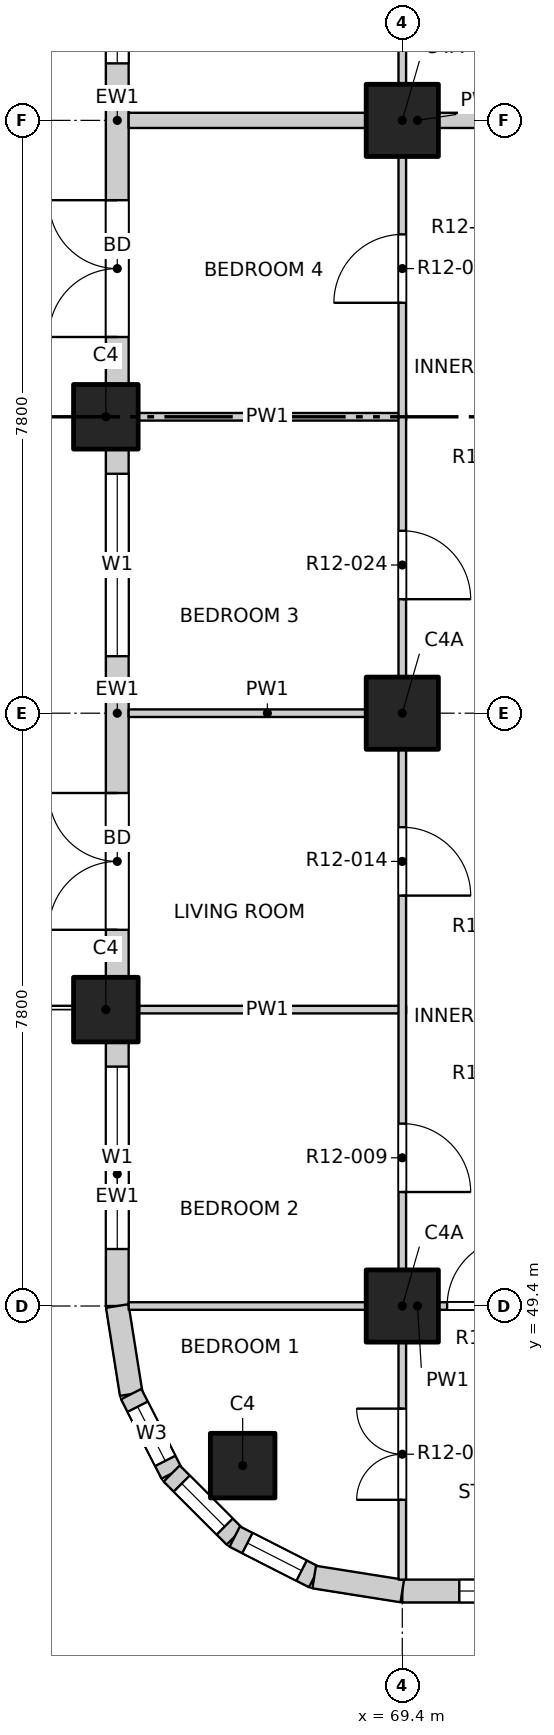
"""IFC4 building model, lengths in metres.
Left out: names, types, materials, properties, quantities, classifications, styles, units other than length and angle.
Written with IfcOpenShell. Run it as: python <this file> out.ifc"""

import sys

from ifc_helpers import new_model, si_unit, direction, frame, frame_2d, origin, origin_2d, place, context, subcontext, project, spatial, rectangle, extrude, element, fill, save


model = new_model("IFC4")
c1 = context("Model", 3, precision=1e-05, world=origin(), true_north=direction((0.0, 1.0)))
c2 = subcontext(c1, "Body", "Model", "MODEL_VIEW")
j1 = project(units=[si_unit("LENGTHUNIT", "METRE"), si_unit("PLANEANGLEUNIT", "RADIAN")], contexts=[c1])
p1 = place(None, origin())
s1 = spatial("IfcSite", under=j1, at=p1, CompositionType="ELEMENT")
p2 = place(p1, origin())
s2 = spatial("IfcBuilding", under=s1, at=p2, CompositionType="ELEMENT")
p3 = place(p2, frame((0.0, 0.0, 137.3)))
s3 = spatial("IfcBuildingStorey", under=s2, at=p3, CompositionType="ELEMENT", Elevation=137.3)
for number, where, z_axis, x_axis in (
    (1, (67.3, 47.3, -0.25), (0.0, 0.0, 1.0), (1.0, 0.0, 0.0)),
    (2, (65.5, 53.3, -0.25), (0.0, 0.0, 1.0), (1.0, 0.0, 0.0)),
    (3, (65.5, 61.1, -0.25), (0.0, 0.0, 1.0), (1.0, 0.0, 0.0)),
):
    element("IfcColumn", number, at=place(p3, frame(where, z_axis=z_axis, x_axis=x_axis)), inside=s3, PredefinedType="COLUMN", context=c2, shape_type="SweptSolid", body=[
        extrude(rectangle(XDim=0.85, YDim=0.85, at=origin_2d()), origin(), (0.0, 0.0, 1.0), 3.4),
    ])
for number, where, z_axis, x_axis in (
    (4, (69.4, 49.4, -0.25), (0.0, 0.0, 1.0), (1.0, 0.0, 0.0)),
    (5, (69.4, 57.2, -0.25), (0.0, 0.0, 1.0), (1.0, 0.0, 0.0)),
    (6, (69.4, 65.0, -0.25), (0.0, 0.0, 1.0), (1.0, 0.0, 0.0)),
):
    element("IfcColumn", number, at=place(p3, frame(where, z_axis=z_axis, x_axis=x_axis)), inside=s3, PredefinedType="COLUMN", context=c2, shape_type="SweptSolid", body=[
        extrude(rectangle(XDim=0.95, YDim=0.95, at=origin_2d()), origin(), (0.0, 0.0, 1.0), 3.4),
    ])
p4 = place(p3, frame((69.4, 45.65, 0.0), z_axis=(0.0, 0.0, 1.0), x_axis=(1.0, 0.0, 0.0)))
e7 = element("IfcWall", 7, at=p4, inside=s3, PredefinedType="SOLIDWALL", context=c2, shape_type="SweptSolid", body=[
    extrude(rectangle(XDim=3.475, YDim=0.3, at=frame_2d((1.738, 0.0))), origin(), (0.0, 0.0, 1.0), 2.7),
])
p5 = place(p4, frame((0.75, 0.0, 0.9)))
e8 = element("IfcOpeningElement", 8, at=p5, cuts=e7, PredefinedType="OPENING", context=c2, shape_type="SweptSolid", body=[
    extrude(rectangle(XDim=2.4, YDim=1.8, at=frame_2d((1.2, 0.9))), frame((0.0, 0.16, 0.0), z_axis=(0.0, -1.0, 0.0), x_axis=(1.0, 0.0, 0.0)), (0.0, 0.0, 1.0), 0.32),
])
p6 = place(p3, frame((65.65, 49.4, 0.0), z_axis=(0.0, 0.0, 1.0), x_axis=(0.0, 1.0, 0.0)))
e9 = element("IfcWall", 9, at=p6, inside=s3, PredefinedType="SOLIDWALL", context=c2, shape_type="SweptSolid", body=[
    extrude(rectangle(XDim=3.475, YDim=0.3, at=frame_2d((1.738, 0.0))), origin(), (0.0, 0.0, 1.0), 2.7),
])
p7 = place(p6, frame((0.75, 0.0, 0.9)))
e10 = element("IfcOpeningElement", 10, at=p7, cuts=e9, PredefinedType="OPENING", context=c2, shape_type="SweptSolid", body=[
    extrude(rectangle(XDim=2.4, YDim=1.8, at=frame_2d((1.2, 0.9))), frame((0.0, 0.16, 0.0), z_axis=(0.0, -1.0, 0.0), x_axis=(1.0, 0.0, 0.0)), (0.0, 0.0, 1.0), 0.32),
])
p8 = place(p3, frame((65.65, 53.725, 0.0), z_axis=(0.0, 0.0, 1.0), x_axis=(0.0, 1.0, 0.0)))
e11 = element("IfcWall", 11, at=p8, inside=s3, PredefinedType="SOLIDWALL", context=c2, shape_type="SweptSolid", body=[
    extrude(rectangle(XDim=6.95, YDim=0.3, at=frame_2d((3.475, 0.0))), origin(), (0.0, 0.0, 1.0), 2.7),
])
p9 = place(p8, frame((0.625, 0.0, 0.0)))
e12 = element("IfcOpeningElement", 12, at=p9, cuts=e11, PredefinedType="OPENING", context=c2, shape_type="SweptSolid", body=[
    extrude(rectangle(XDim=1.8, YDim=2.4, at=frame_2d((0.9, 1.2))), frame((0.0, 0.16, 0.0), z_axis=(0.0, -1.0, 0.0), x_axis=(1.0, 0.0, 0.0)), (0.0, 0.0, 1.0), 0.32),
])
p10 = place(p8, frame((4.225, 0.0, 0.9)))
e13 = element("IfcOpeningElement", 13, at=p10, cuts=e11, PredefinedType="OPENING", context=c2, shape_type="SweptSolid", body=[
    extrude(rectangle(XDim=2.4, YDim=1.8, at=frame_2d((1.2, 0.9))), frame((0.0, 0.16, 0.0), z_axis=(0.0, -1.0, 0.0), x_axis=(1.0, 0.0, 0.0)), (0.0, 0.0, 1.0), 0.32),
])
p11 = place(p3, frame((65.65, 61.525, 0.0), z_axis=(0.0, 0.0, 1.0), x_axis=(0.0, 1.0, 0.0)))
e14 = element("IfcWall", 14, at=p11, inside=s3, PredefinedType="SOLIDWALL", context=c2, shape_type="SweptSolid", body=[
    extrude(rectangle(XDim=6.95, YDim=0.3, at=frame_2d((3.475, 0.0))), origin(), (0.0, 0.0, 1.0), 2.7),
])
p12 = place(p11, frame((0.625, 0.0, 0.0)))
e15 = element("IfcOpeningElement", 15, at=p12, cuts=e14, PredefinedType="OPENING", context=c2, shape_type="SweptSolid", body=[
    extrude(rectangle(XDim=1.8, YDim=2.4, at=frame_2d((0.9, 1.2))), frame((0.0, 0.16, 0.0), z_axis=(0.0, -1.0, 0.0), x_axis=(1.0, 0.0, 0.0)), (0.0, 0.0, 1.0), 0.32),
])
p13 = place(p11, frame((4.225, 0.0, 0.9)))
e16 = element("IfcOpeningElement", 16, at=p13, cuts=e14, PredefinedType="OPENING", context=c2, shape_type="SweptSolid", body=[
    extrude(rectangle(XDim=2.4, YDim=1.8, at=frame_2d((1.2, 0.9))), frame((0.0, 0.16, 0.0), z_axis=(0.0, -1.0, 0.0), x_axis=(1.0, 0.0, 0.0)), (0.0, 0.0, 1.0), 0.32),
])
p14 = place(p3, frame((65.65, 49.4, 0.0), z_axis=(0.0, 0.0, 1.0), x_axis=(0.156496880861, -0.987678452879, 0.0)))
e17 = element("IfcWall", 17, at=p14, inside=s3, PredefinedType="SOLIDWALL", context=c2, shape_type="SweptSolid", body=[
    extrude(rectangle(XDim=1.173, YDim=0.3, at=frame_2d((0.586, 0.0))), origin(), (0.0, 0.0, 1.0), 2.7),
])
p15 = place(p3, frame((65.833, 48.241, 0.0), z_axis=(0.0, 0.0, 1.0), x_axis=(0.454025524128, -0.890988677504, 0.0)))
e18 = element("IfcWall", 18, at=p15, inside=s3, PredefinedType="SOLIDWALL", context=c2, shape_type="SweptSolid", body=[
    extrude(rectangle(XDim=1.173, YDim=0.3, at=frame_2d((0.587, 0.0))), origin(), (0.0, 0.0, 1.0), 2.7),
])
p16 = place(p15, frame((0.187, 0.0, 0.9)))
e19 = element("IfcOpeningElement", 19, at=p16, cuts=e18, PredefinedType="OPENING", context=c2, shape_type="SweptSolid", body=[
    extrude(rectangle(XDim=0.8, YDim=1.2, at=frame_2d((0.4, 0.6))), frame((0.0, 0.16, 0.0), z_axis=(0.0, -1.0, 0.0), x_axis=(1.0, 0.0, 0.0)), (0.0, 0.0, 1.0), 0.32),
])
p17 = place(p3, frame((66.366, 47.196, 0.0), z_axis=(0.0, 0.0, 1.0), x_axis=(0.707106781187, -0.707106781187, 0.0)))
e20 = element("IfcWall", 20, at=p17, inside=s3, PredefinedType="SOLIDWALL", context=c2, shape_type="SweptSolid", body=[
    extrude(rectangle(XDim=1.173, YDim=0.3, at=frame_2d((0.586, 0.0))), origin(), (0.0, 0.0, 1.0), 2.7),
])
p18 = place(p17, frame((0.187, 0.0, 0.9)))
e21 = element("IfcOpeningElement", 21, at=p18, cuts=e20, PredefinedType="OPENING", context=c2, shape_type="SweptSolid", body=[
    extrude(rectangle(XDim=0.8, YDim=1.2, at=frame_2d((0.4, 0.6))), frame((0.0, 0.16, 0.0), z_axis=(0.0, -1.0, 0.0), x_axis=(1.0, 0.0, 0.0)), (0.0, 0.0, 1.0), 0.32),
])
p19 = place(p3, frame((67.196, 46.366, 0.0), z_axis=(0.0, 0.0, 1.0), x_axis=(0.890988677504, -0.454025524128, 0.0)))
e22 = element("IfcWall", 22, at=p19, inside=s3, PredefinedType="SOLIDWALL", context=c2, shape_type="SweptSolid", body=[
    extrude(rectangle(XDim=1.173, YDim=0.3, at=frame_2d((0.587, 0.0))), origin(), (0.0, 0.0, 1.0), 2.7),
])
p20 = place(p19, frame((0.187, 0.0, 0.9)))
e23 = element("IfcOpeningElement", 23, at=p20, cuts=e22, PredefinedType="OPENING", context=c2, shape_type="SweptSolid", body=[
    extrude(rectangle(XDim=0.8, YDim=1.2, at=frame_2d((0.4, 0.6))), frame((0.0, 0.16, 0.0), z_axis=(0.0, -1.0, 0.0), x_axis=(1.0, 0.0, 0.0)), (0.0, 0.0, 1.0), 0.32),
])
p21 = place(p3, frame((68.241, 45.833, 0.0), z_axis=(0.0, 0.0, 1.0), x_axis=(0.987678452879, -0.156496880861, 0.0)))
e24 = element("IfcWall", 24, at=p21, inside=s3, PredefinedType="SOLIDWALL", context=c2, shape_type="SweptSolid", body=[
    extrude(rectangle(XDim=1.173, YDim=0.3, at=frame_2d((0.586, 0.0))), origin(), (0.0, 0.0, 1.0), 2.7),
])
p22 = place(p3, frame((65.8, 49.4, 0.0), z_axis=(0.0, 0.0, 1.0), x_axis=(1.0, 0.0, 0.0)))
e25 = element("IfcWall", 25, at=p22, inside=s3, PredefinedType="PARTITIONING", context=c2, shape_type="SweptSolid", body=[
    extrude(rectangle(XDim=7.6, YDim=0.1, at=frame_2d((3.8, 0.0))), origin(), (0.0, 0.0, 1.0), 3.15),
])
p23 = place(p22, frame((4.19, 0.0, 0.0)))
e26 = element("IfcOpeningElement", 26, at=p23, cuts=e25, PredefinedType="OPENING", context=c2, shape_type="SweptSolid", body=[
    extrude(rectangle(XDim=0.9, YDim=2.1, at=frame_2d((0.45, 1.05))), frame((0.0, 0.06, 0.0), z_axis=(0.0, -1.0, 0.0), x_axis=(1.0, 0.0, 0.0)), (0.0, 0.0, 1.0), 0.12),
])
for number, where, z_axis, x_axis in (
    (27, (65.8, 53.3, 0.0), (0.0, 0.0, 1.0), (1.0, 0.0, 0.0)),
    (28, (65.8, 57.2, 0.0), (0.0, 0.0, 1.0), (1.0, 0.0, 0.0)),
):
    element("IfcWall", number, at=place(p3, frame(where, z_axis=z_axis, x_axis=x_axis)), inside=s3, PredefinedType="PARTITIONING", context=c2, shape_type="SweptSolid", body=[
        extrude(rectangle(XDim=3.65, YDim=0.1, at=frame_2d((1.825, 0.0))), origin(), (0.0, 0.0, 1.0), 3.15),
    ])
p24 = place(p3, frame((65.8, 61.1, 0.0), z_axis=(0.0, 0.0, 1.0), x_axis=(1.0, 0.0, 0.0)))
e29 = element("IfcWall", 29, at=p24, inside=s3, PredefinedType="PARTITIONING", context=c2, shape_type="SweptSolid", body=[
    extrude(rectangle(XDim=3.65, YDim=0.1, at=frame_2d((1.825, 0.0))), origin(), (0.0, 0.0, 1.0), 2.55),
])
p25 = place(p3, frame((65.8, 65.0, 0.0), z_axis=(0.0, 0.0, 1.0), x_axis=(1.0, 0.0, 0.0)))
e30 = element("IfcWall", 30, at=p25, inside=s3, PredefinedType="PARTITIONING", context=c2, shape_type="SweptSolid", body=[
    extrude(rectangle(XDim=7.6, YDim=0.2, at=frame_2d((3.8, 0.0))), origin(), (0.0, 0.0, 1.0), 3.15),
])
p26 = place(p3, frame((69.4, 45.8, 0.0), z_axis=(0.0, 0.0, 1.0), x_axis=(0.0, 1.0, 0.0)))
e31 = element("IfcWall", 31, at=p26, inside=s3, PredefinedType="PARTITIONING", context=c2, shape_type="SweptSolid", body=[
    extrude(rectangle(XDim=38.4, YDim=0.1, at=frame_2d((19.2, 0.0))), origin(), (0.0, 0.0, 1.0), 3.15),
])
p27 = place(p26, frame((1.05, 0.0, 0.0)))
e32 = element("IfcOpeningElement", 32, at=p27, cuts=e31, PredefinedType="OPENING", context=c2, shape_type="SweptSolid", body=[
    extrude(rectangle(XDim=1.2, YDim=2.1, at=frame_2d((0.6, 1.05))), frame((0.0, 0.06, 0.0), z_axis=(0.0, -1.0, 0.0), x_axis=(1.0, 0.0, 0.0)), (0.0, 0.0, 1.0), 0.12),
])
p28 = place(p26, frame((5.1, 0.0, 0.0)))
e33 = element("IfcOpeningElement", 33, at=p28, cuts=e31, PredefinedType="OPENING", context=c2, shape_type="SweptSolid", body=[
    extrude(rectangle(XDim=0.9, YDim=2.1, at=frame_2d((0.45, 1.05))), frame((0.0, 0.06, 0.0), z_axis=(0.0, -1.0, 0.0), x_axis=(1.0, 0.0, 0.0)), (0.0, 0.0, 1.0), 0.12),
])
p29 = place(p26, frame((9.0, 0.0, 0.0)))
e34 = element("IfcOpeningElement", 34, at=p29, cuts=e31, PredefinedType="OPENING", context=c2, shape_type="SweptSolid", body=[
    extrude(rectangle(XDim=0.9, YDim=2.1, at=frame_2d((0.45, 1.05))), frame((0.0, 0.06, 0.0), z_axis=(0.0, -1.0, 0.0), x_axis=(1.0, 0.0, 0.0)), (0.0, 0.0, 1.0), 0.12),
])
p30 = place(p26, frame((12.9, 0.0, 0.0)))
e35 = element("IfcOpeningElement", 35, at=p30, cuts=e31, PredefinedType="OPENING", context=c2, shape_type="SweptSolid", body=[
    extrude(rectangle(XDim=0.9, YDim=2.1, at=frame_2d((0.45, 1.05))), frame((0.0, 0.06, 0.0), z_axis=(0.0, -1.0, 0.0), x_axis=(1.0, 0.0, 0.0)), (0.0, 0.0, 1.0), 0.12),
])
p31 = place(p26, frame((16.8, 0.0, 0.0)))
e36 = element("IfcOpeningElement", 36, at=p31, cuts=e31, PredefinedType="OPENING", context=c2, shape_type="SweptSolid", body=[
    extrude(rectangle(XDim=0.9, YDim=2.1, at=frame_2d((0.45, 1.05))), frame((0.0, 0.06, 0.0), z_axis=(0.0, -1.0, 0.0), x_axis=(1.0, 0.0, 0.0)), (0.0, 0.0, 1.0), 0.12),
])
p32 = place(p26, frame((20.7, 0.0, 0.0)))
e37 = element("IfcOpeningElement", 37, at=p32, cuts=e31, PredefinedType="OPENING", context=c2, shape_type="SweptSolid", body=[
    extrude(rectangle(XDim=0.9, YDim=2.1, at=frame_2d((0.45, 1.05))), frame((0.0, 0.06, 0.0), z_axis=(0.0, -1.0, 0.0), x_axis=(1.0, 0.0, 0.0)), (0.0, 0.0, 1.0), 0.12),
])
p33 = place(p26, frame((24.6, 0.0, 0.0)))
e38 = element("IfcOpeningElement", 38, at=p33, cuts=e31, PredefinedType="OPENING", context=c2, shape_type="SweptSolid", body=[
    extrude(rectangle(XDim=0.9, YDim=2.1, at=frame_2d((0.45, 1.05))), frame((0.0, 0.06, 0.0), z_axis=(0.0, -1.0, 0.0), x_axis=(1.0, 0.0, 0.0)), (0.0, 0.0, 1.0), 0.12),
])
p34 = place(p26, frame((28.5, 0.0, 0.0)))
e39 = element("IfcOpeningElement", 39, at=p34, cuts=e31, PredefinedType="OPENING", context=c2, shape_type="SweptSolid", body=[
    extrude(rectangle(XDim=0.9, YDim=2.1, at=frame_2d((0.45, 1.05))), frame((0.0, 0.06, 0.0), z_axis=(0.0, -1.0, 0.0), x_axis=(1.0, 0.0, 0.0)), (0.0, 0.0, 1.0), 0.12),
])
p35 = place(p26, frame((32.4, 0.0, 0.0)))
e40 = element("IfcOpeningElement", 40, at=p35, cuts=e31, PredefinedType="OPENING", context=c2, shape_type="SweptSolid", body=[
    extrude(rectangle(XDim=0.9, YDim=2.1, at=frame_2d((0.45, 1.05))), frame((0.0, 0.06, 0.0), z_axis=(0.0, -1.0, 0.0), x_axis=(1.0, 0.0, 0.0)), (0.0, 0.0, 1.0), 0.12),
])
p36 = place(p26, frame((36.15, 0.0, 0.0)))
e41 = element("IfcOpeningElement", 41, at=p36, cuts=e31, PredefinedType="OPENING", context=c2, shape_type="SweptSolid", body=[
    extrude(rectangle(XDim=1.2, YDim=2.1, at=frame_2d((0.6, 1.05))), frame((0.0, 0.06, 0.0), z_axis=(0.0, -1.0, 0.0), x_axis=(1.0, 0.0, 0.0)), (0.0, 0.0, 1.0), 0.12),
])
p37 = place(p5, origin())
e42 = element("IfcWindow", 42, at=p37, inside=s3, PartitioningType="DOUBLE_PANEL_VERTICAL", PredefinedType="WINDOW", context=c2, shape_type="SweptSolid", body=[
    extrude(rectangle(XDim=2.4, YDim=1.8, at=frame_2d((1.2, 0.9))), frame((0.0, 0.03, 0.0), z_axis=(0.0, -1.0, 0.0), x_axis=(1.0, 0.0, 0.0)), (0.0, 0.0, 1.0), 0.06),
])
fill(e8, e42)
p38 = place(p7, origin())
e43 = element("IfcWindow", 43, at=p38, inside=s3, PartitioningType="DOUBLE_PANEL_VERTICAL", PredefinedType="WINDOW", context=c2, shape_type="SweptSolid", body=[
    extrude(rectangle(XDim=2.4, YDim=1.8, at=frame_2d((1.2, 0.9))), frame((0.0, 0.03, 0.0), z_axis=(0.0, -1.0, 0.0), x_axis=(1.0, 0.0, 0.0)), (0.0, 0.0, 1.0), 0.06),
])
fill(e10, e43)
p39 = place(p9, origin())
e44 = element("IfcDoor", 44, at=p39, inside=s3, OperationType="DOUBLE_DOOR_SINGLE_SWING", PredefinedType="DOOR", context=c2, shape_type="SweptSolid", body=[
    extrude(rectangle(XDim=1.8, YDim=2.4, at=frame_2d((0.9, 1.2))), frame((0.0, 0.025, 0.0), z_axis=(0.0, -1.0, 0.0), x_axis=(1.0, 0.0, 0.0)), (0.0, 0.0, 1.0), 0.05),
])
fill(e12, e44)
p40 = place(p10, origin())
e45 = element("IfcWindow", 45, at=p40, inside=s3, PartitioningType="DOUBLE_PANEL_VERTICAL", PredefinedType="WINDOW", context=c2, shape_type="SweptSolid", body=[
    extrude(rectangle(XDim=2.4, YDim=1.8, at=frame_2d((1.2, 0.9))), frame((0.0, 0.03, 0.0), z_axis=(0.0, -1.0, 0.0), x_axis=(1.0, 0.0, 0.0)), (0.0, 0.0, 1.0), 0.06),
])
fill(e13, e45)
p41 = place(p12, origin())
e46 = element("IfcDoor", 46, at=p41, inside=s3, OperationType="DOUBLE_DOOR_SINGLE_SWING", PredefinedType="DOOR", context=c2, shape_type="SweptSolid", body=[
    extrude(rectangle(XDim=1.8, YDim=2.4, at=frame_2d((0.9, 1.2))), frame((0.0, 0.025, 0.0), z_axis=(0.0, -1.0, 0.0), x_axis=(1.0, 0.0, 0.0)), (0.0, 0.0, 1.0), 0.05),
])
fill(e15, e46)
p42 = place(p13, origin())
e47 = element("IfcWindow", 47, at=p42, inside=s3, PartitioningType="DOUBLE_PANEL_VERTICAL", PredefinedType="WINDOW", context=c2, shape_type="SweptSolid", body=[
    extrude(rectangle(XDim=2.4, YDim=1.8, at=frame_2d((1.2, 0.9))), frame((0.0, 0.03, 0.0), z_axis=(0.0, -1.0, 0.0), x_axis=(1.0, 0.0, 0.0)), (0.0, 0.0, 1.0), 0.06),
])
fill(e16, e47)
p43 = place(p16, origin())
e48 = element("IfcWindow", 48, at=p43, inside=s3, PartitioningType="SINGLE_PANEL", PredefinedType="WINDOW", context=c2, shape_type="SweptSolid", body=[
    extrude(rectangle(XDim=0.8, YDim=1.2, at=frame_2d((0.4, 0.6))), frame((0.0, 0.03, 0.0), z_axis=(0.0, -1.0, 0.0), x_axis=(1.0, 0.0, 0.0)), (0.0, 0.0, 1.0), 0.06),
])
fill(e19, e48)
p44 = place(p18, origin())
e49 = element("IfcWindow", 49, at=p44, inside=s3, PartitioningType="SINGLE_PANEL", PredefinedType="WINDOW", context=c2, shape_type="SweptSolid", body=[
    extrude(rectangle(XDim=0.8, YDim=1.2, at=frame_2d((0.4, 0.6))), frame((0.0, 0.03, 0.0), z_axis=(0.0, -1.0, 0.0), x_axis=(1.0, 0.0, 0.0)), (0.0, 0.0, 1.0), 0.06),
])
fill(e21, e49)
p45 = place(p20, origin())
e50 = element("IfcWindow", 50, at=p45, inside=s3, PartitioningType="SINGLE_PANEL", PredefinedType="WINDOW", context=c2, shape_type="SweptSolid", body=[
    extrude(rectangle(XDim=0.8, YDim=1.2, at=frame_2d((0.4, 0.6))), frame((0.0, 0.03, 0.0), z_axis=(0.0, -1.0, 0.0), x_axis=(1.0, 0.0, 0.0)), (0.0, 0.0, 1.0), 0.06),
])
fill(e23, e50)
p46 = place(p27, origin())
e51 = element("IfcDoor", 51, at=p46, inside=s3, OperationType="DOUBLE_DOOR_SINGLE_SWING", PredefinedType="DOOR", context=c2, shape_type="SweptSolid", body=[
    extrude(rectangle(XDim=1.2, YDim=2.1, at=frame_2d((0.6, 1.05))), frame((0.0, 0.025, 0.0), z_axis=(0.0, -1.0, 0.0), x_axis=(1.0, 0.0, 0.0)), (0.0, 0.0, 1.0), 0.05),
])
fill(e32, e51)
p47 = place(p23, origin())
e52 = element("IfcDoor", 52, at=p47, inside=s3, OperationType="SINGLE_SWING_RIGHT", PredefinedType="DOOR", context=c2, shape_type="SweptSolid", body=[
    extrude(rectangle(XDim=0.9, YDim=2.1, at=frame_2d((0.45, 1.05))), frame((0.0, 0.025, 0.0), z_axis=(0.0, -1.0, 0.0), x_axis=(1.0, 0.0, 0.0)), (0.0, 0.0, 1.0), 0.05),
])
fill(e26, e52)
p48 = place(p28, origin())
e53 = element("IfcDoor", 53, at=p48, inside=s3, OperationType="SINGLE_SWING_RIGHT", PredefinedType="DOOR", context=c2, shape_type="SweptSolid", body=[
    extrude(rectangle(XDim=0.9, YDim=2.1, at=frame_2d((0.45, 1.05))), frame((0.0, 0.025, 0.0), z_axis=(0.0, -1.0, 0.0), x_axis=(1.0, 0.0, 0.0)), (0.0, 0.0, 1.0), 0.05),
])
fill(e33, e53)
p49 = place(p29, origin())
e54 = element("IfcDoor", 54, at=p49, inside=s3, OperationType="SINGLE_SWING_RIGHT", PredefinedType="DOOR", context=c2, shape_type="SweptSolid", body=[
    extrude(rectangle(XDim=0.9, YDim=2.1, at=frame_2d((0.45, 1.05))), frame((0.0, 0.025, 0.0), z_axis=(0.0, -1.0, 0.0), x_axis=(1.0, 0.0, 0.0)), (0.0, 0.0, 1.0), 0.05),
])
fill(e34, e54)
p50 = place(p30, origin())
e55 = element("IfcDoor", 55, at=p50, inside=s3, OperationType="SINGLE_SWING_RIGHT", PredefinedType="DOOR", context=c2, shape_type="SweptSolid", body=[
    extrude(rectangle(XDim=0.9, YDim=2.1, at=frame_2d((0.45, 1.05))), frame((0.0, 0.025, 0.0), z_axis=(0.0, -1.0, 0.0), x_axis=(1.0, 0.0, 0.0)), (0.0, 0.0, 1.0), 0.05),
])
fill(e35, e55)
p51 = place(p31, origin())
e56 = element("IfcDoor", 56, at=p51, inside=s3, OperationType="SINGLE_SWING_LEFT", PredefinedType="DOOR", context=c2, shape_type="SweptSolid", body=[
    extrude(rectangle(XDim=0.9, YDim=2.1, at=frame_2d((0.45, 1.05))), frame((0.0, 0.025, 0.0), z_axis=(0.0, -1.0, 0.0), x_axis=(1.0, 0.0, 0.0)), (0.0, 0.0, 1.0), 0.05),
])
fill(e36, e56)
save(model, sys.argv[1])
